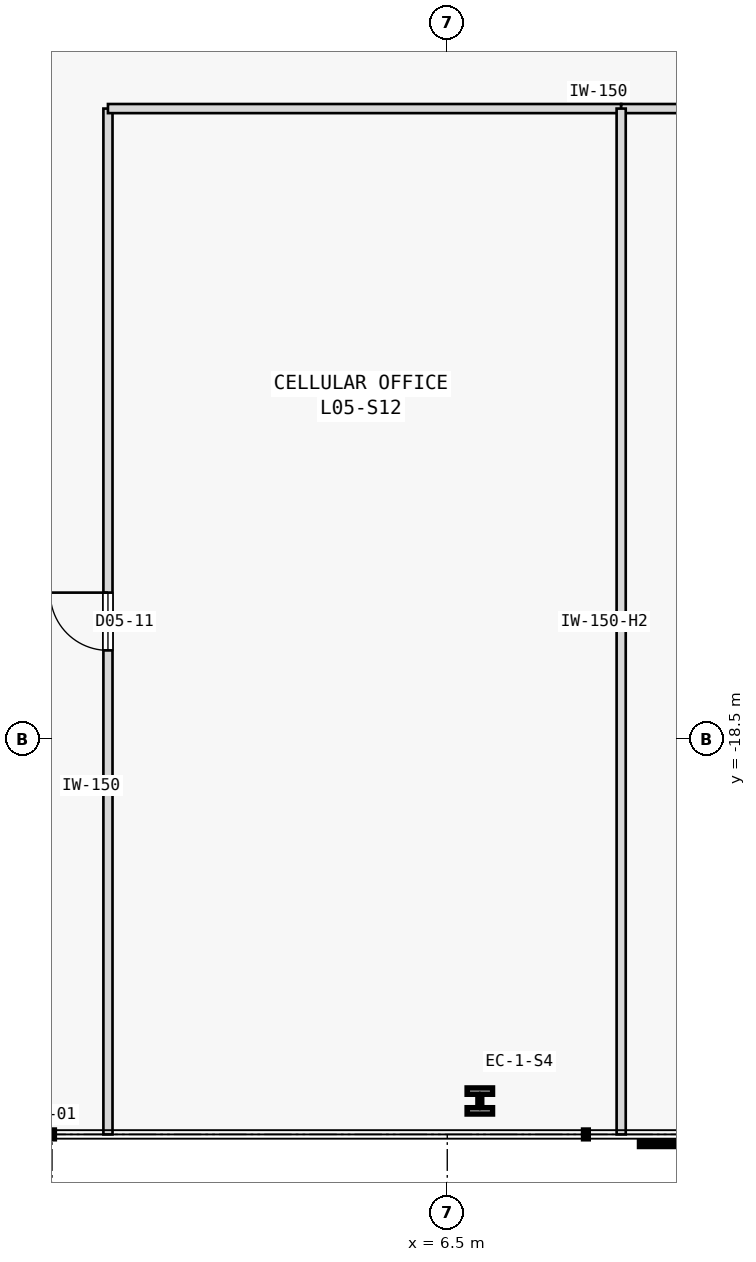
"""IFC4 building model, lengths in metres.
Left out: names, types, materials, properties, quantities, classifications, styles, units other than length and angle.
Written with IfcOpenShell. Run it as: python <this file> out.ifc"""

import sys

from ifc_helpers import new_model, si_unit, direction, frame, frame_2d, origin, origin_2d, place, context, subcontext, project, spatial, rectangle, i_section, extrude, element, fill, save


model = new_model("IFC4")
c1 = context("Model", 3, precision=1e-05, world=origin(), true_north=direction((0.0, 1.0)))
c2 = subcontext(c1, "Body", "Model", "MODEL_VIEW")
j1 = project(units=[si_unit("LENGTHUNIT", "METRE"), si_unit("PLANEANGLEUNIT", "RADIAN")], contexts=[c1])
p1 = place(None, origin())
s1 = spatial("IfcSite", under=j1, at=p1, CompositionType="ELEMENT")
p2 = place(p1, origin())
s2 = spatial("IfcBuilding", under=s1, at=p2, CompositionType="ELEMENT")
p3 = place(p2, frame((0.0, 0.0, 25.6)))
s3 = spatial("IfcBuildingStorey", under=s2, at=p3, CompositionType="ELEMENT", Elevation=25.6)
p4 = place(p3, frame((7.036, -24.45, 0.0), z_axis=(0.0, 0.0, 1.0), x_axis=(1.0, 0.0, 0.0)))
e1 = element("IfcColumn", 1, at=p4, inside=s3, PredefinedType="COLUMN", context=c2, shape_type="SweptSolid", body=[
    extrude(i_section(OverallWidth=0.42, OverallDepth=0.431, WebThickness=0.065, FlangeThickness=0.106, FilletRadius=0.015, at=origin_2d()), origin(), (0.0, 0.0, 1.0), 3.8),
])
p5 = place(p3, frame((0.92, -25.0, 0.0), z_axis=(0.0, 0.0, 1.0), x_axis=(0.0, 1.0, 0.0)))
e2 = element("IfcWall", 2, at=p5, inside=s3, PredefinedType="PARTITIONING", context=c2, shape_type="SweptSolid", body=[
    extrude(rectangle(XDim=16.87, YDim=0.15, at=frame_2d((8.435, 0.0))), origin(), (0.0, 0.0, 1.0), 3.575),
])
p6 = place(p5, frame((7.96, 0.0, 0.0)))
e3 = element("IfcOpeningElement", 3, at=p6, cuts=e2, PredefinedType="OPENING", context=c2, shape_type="SweptSolid", body=[
    extrude(rectangle(XDim=0.95, YDim=2.15, at=frame_2d((0.475, 1.075))), frame((0.0, 0.085, 0.0), z_axis=(0.0, -1.0, 0.0), x_axis=(1.0, 0.0, 0.0)), (0.0, 0.0, 1.0), 0.17),
])
p7 = place(p3, frame((0.92, -8.13, 0.0), z_axis=(0.0, 0.0, 1.0), x_axis=(1.0, 0.0, 0.0)))
e4 = element("IfcWall", 4, at=p7, inside=s3, PredefinedType="PARTITIONING", context=c2, shape_type="SweptSolid", body=[
    extrude(rectangle(XDim=8.44, YDim=0.15, at=frame_2d((4.22, 0.0))), origin(), (0.0, 0.0, 1.0), 3.575),
])
p8 = place(p3, frame((9.36, -8.13, 0.0), z_axis=(0.0, 0.0, 1.0), x_axis=(1.0, 0.0, 0.0)))
e5 = element("IfcWall", 5, at=p8, inside=s3, PredefinedType="PARTITIONING", context=c2, shape_type="SweptSolid", body=[
    extrude(rectangle(XDim=7.699, YDim=0.15, at=frame_2d((3.85, 0.0))), origin(), (0.0, 0.0, 1.0), 3.575),
])
p9 = place(p8, frame((3.375, 0.0, 0.0)))
e6 = element("IfcOpeningElement", 6, at=p9, cuts=e5, PredefinedType="OPENING", context=c2, shape_type="SweptSolid", body=[
    extrude(rectangle(XDim=0.95, YDim=2.15, at=frame_2d((0.475, 1.075))), frame((0.0, 0.085, 0.0), z_axis=(0.0, -1.0, 0.0), x_axis=(1.0, 0.0, 0.0)), (0.0, 0.0, 1.0), 0.17),
])
p10 = place(p3, frame((9.36, -25.0, 0.0), z_axis=(0.0, 0.0, 1.0), x_axis=(0.0, 1.0, 0.0)))
e7 = element("IfcWall", 7, at=p10, inside=s3, PredefinedType="PARTITIONING", context=c2, shape_type="SweptSolid", body=[
    extrude(rectangle(XDim=16.87, YDim=0.15, at=frame_2d((8.435, 0.0))), origin(), (0.0, 0.0, 1.0), 2.975),
])
p11 = place(p6, origin())
e8 = element("IfcDoor", 8, at=p11, inside=s3, OperationType="SINGLE_SWING_RIGHT", PredefinedType="DOOR", context=c2, shape_type="SweptSolid", body=[
    extrude(rectangle(XDim=0.95, YDim=2.15, at=frame_2d((0.475, 1.075))), frame((0.0, 0.025, 0.0), z_axis=(0.0, -1.0, 0.0), x_axis=(1.0, 0.0, 0.0)), (0.0, 0.0, 1.0), 0.05),
])
fill(e3, e8)
save(model, sys.argv[1])
